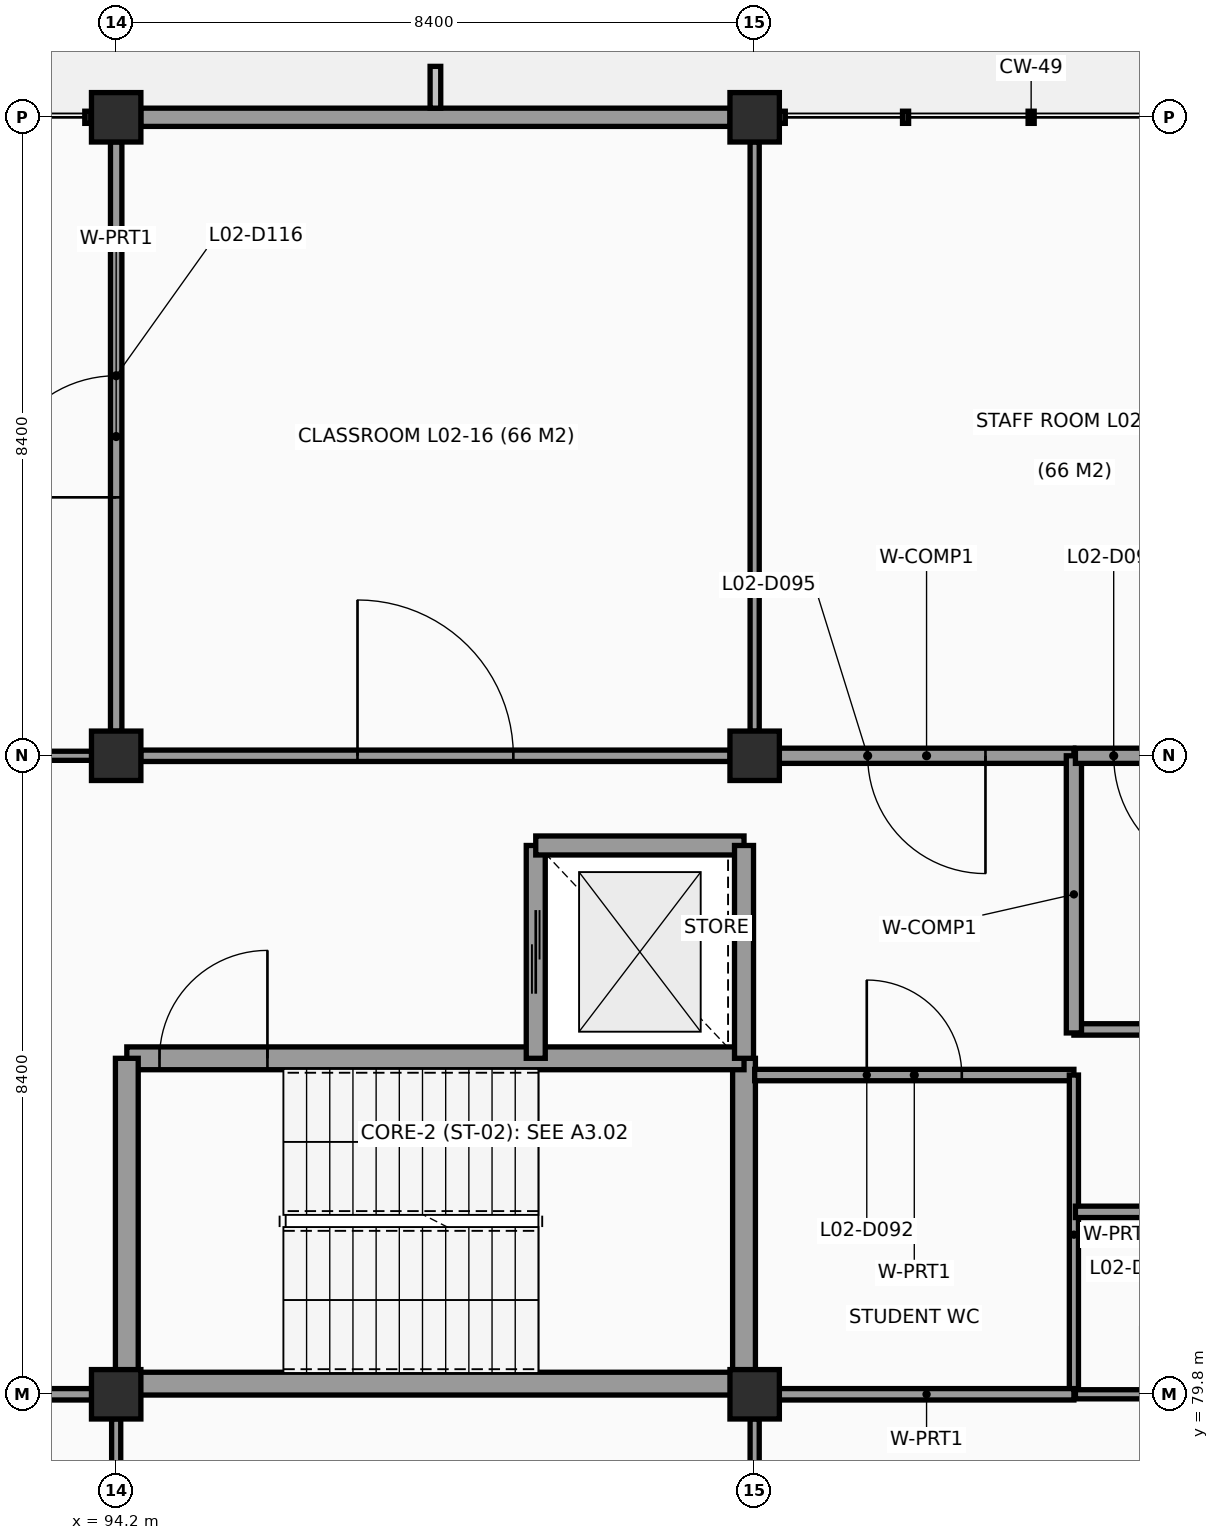
"""IFC4 building model, lengths in metres.
Left out: names, types, materials, properties, quantities, classifications, styles, units other than length and angle.
Written with IfcOpenShell. Run it as: python <this file> out.ifc"""

import sys

from ifc_helpers import new_model, si_unit, direction, frame, frame_2d, origin, origin_2d, place, context, subcontext, project, spatial, rectangle, extrude, element, fill, save


model = new_model("IFC4")
c1 = context("Model", 3, precision=1e-05, world=origin(), true_north=direction((0.0, 1.0)))
c2 = subcontext(c1, "Body", "Model", "MODEL_VIEW")
j1 = project(units=[si_unit("LENGTHUNIT", "METRE"), si_unit("PLANEANGLEUNIT", "RADIAN")], contexts=[c1])
p1 = place(None, origin())
s1 = spatial("IfcSite", under=j1, at=p1, CompositionType="ELEMENT")
p2 = place(p1, origin())
s2 = spatial("IfcBuilding", under=s1, at=p2, CompositionType="ELEMENT")
p3 = place(p2, frame((0.0, 0.0, 7.8)))
s3 = spatial("IfcBuildingStorey", under=s2, at=p3, CompositionType="ELEMENT", Elevation=7.8)
for number, where, z_axis, x_axis in (
    (1, (94.2, 79.8, 0.0), (0.0, 0.0, 1.0), (1.0, 0.0, 0.0)),
    (2, (94.2, 88.2, 0.0), (0.0, 0.0, 1.0), (1.0, 0.0, 0.0)),
    (3, (94.2, 96.6, 0.0), (0.0, 0.0, 1.0), (1.0, 0.0, 0.0)),
    (4, (102.6, 79.8, 0.0), (0.0, 0.0, 1.0), (1.0, 0.0, 0.0)),
    (5, (102.6, 88.2, 0.0), (0.0, 0.0, 1.0), (1.0, 0.0, 0.0)),
    (6, (102.6, 96.6, 0.0), (0.0, 0.0, 1.0), (1.0, 0.0, 0.0)),
):
    element("IfcColumn", number, at=place(p3, frame(where, z_axis=z_axis, x_axis=x_axis)), inside=s3, PredefinedType="COLUMN", context=c2, shape_type="SweptSolid", body=[
        extrude(rectangle(XDim=0.65, YDim=0.65, at=origin_2d()), origin(), (0.0, 0.0, 1.0), 3.6),
    ])
p4 = place(p3, frame((94.523, 96.6, 0.0), z_axis=(0.0, 0.0, 1.0), x_axis=(1.0, 0.0, 0.0)))
e7 = element("IfcWall", 7, at=p4, inside=s3, PredefinedType="SOLIDWALL", context=c2, shape_type="SweptSolid", body=[
    extrude(rectangle(XDim=7.754, YDim=0.24, at=frame_2d((3.877, 0.0))), origin(), (0.0, 0.0, 1.0), 2.64),
])
p5 = place(p3, frame((94.34, 79.94, 0.0), z_axis=(0.0, 0.0, 1.0), x_axis=(1.0, 0.0, 0.0)))
e8 = element("IfcWall", 8, at=p5, inside=s3, PredefinedType="SHEAR", context=c2, shape_type="SweptSolid", body=[
    extrude(rectangle(XDim=8.12, YDim=0.3, at=frame_2d((4.06, 0.0))), origin(), (0.0, 0.0, 1.0), 3.6),
])
p6 = place(p3, frame((102.46, 79.94, 0.0), z_axis=(0.0, 0.0, 1.0), x_axis=(0.0, 1.0, 0.0)))
e9 = element("IfcWall", 9, at=p6, inside=s3, PredefinedType="SHEAR", context=c2, shape_type="SweptSolid", body=[
    extrude(rectangle(XDim=4.28, YDim=0.3, at=frame_2d((2.14, 0.0))), origin(), (0.0, 0.0, 1.0), 3.6),
])
p7 = place(p3, frame((102.46, 84.22, 0.0), z_axis=(0.0, 0.0, 1.0), x_axis=(-1.0, 0.0, 0.0)))
e10 = element("IfcWall", 10, at=p7, inside=s3, PredefinedType="SHEAR", context=c2, shape_type="SweptSolid", body=[
    extrude(rectangle(XDim=8.12, YDim=0.3, at=frame_2d((4.06, 0.0))), origin(), (0.0, 0.0, 1.0), 3.6),
])
p8 = place(p7, frame((6.27, 0.0, 0.0)))
e11 = element("IfcOpeningElement", 11, at=p8, cuts=e10, PredefinedType="OPENING", context=c2, shape_type="SweptSolid", body=[
    extrude(rectangle(XDim=1.42, YDim=2.15, at=frame_2d((0.71, 1.075))), frame((0.0, 0.16, 0.0), z_axis=(0.0, -1.0, 0.0), x_axis=(1.0, 0.0, 0.0)), (0.0, 0.0, 1.0), 0.32),
])
p9 = place(p3, frame((94.34, 84.22, 0.0), z_axis=(0.0, 0.0, 1.0), x_axis=(0.0, -1.0, 0.0)))
e12 = element("IfcWall", 12, at=p9, inside=s3, PredefinedType="SHEAR", context=c2, shape_type="SweptSolid", body=[
    extrude(rectangle(XDim=4.28, YDim=0.3, at=frame_2d((2.14, 0.0))), origin(), (0.0, 0.0, 1.0), 3.6),
])
p10 = place(p3, frame((99.72, 87.02, 0.0), z_axis=(0.0, 0.0, 1.0), x_axis=(0.0, -1.0, 0.0)))
e13 = element("IfcWall", 13, at=p10, inside=s3, PredefinedType="SHEAR", context=c2, shape_type="SweptSolid", body=[
    extrude(rectangle(XDim=2.8, YDim=0.25, at=frame_2d((1.4, 0.0))), origin(), (0.0, 0.0, 1.0), 3.6),
])
p11 = place(p10, frame((0.85, 0.0, 0.0)))
e14 = element("IfcOpeningElement", 14, at=p11, cuts=e13, PredefinedType="OPENING", context=c2, shape_type="SweptSolid", body=[
    extrude(rectangle(XDim=1.1, YDim=2.15, at=frame_2d((0.55, 1.075))), frame((0.0, 0.135, 0.0), z_axis=(0.0, -1.0, 0.0), x_axis=(1.0, 0.0, 0.0)), (0.0, 0.0, 1.0), 0.27),
])
p12 = place(p3, frame((102.46, 87.02, 0.0), z_axis=(0.0, 0.0, 1.0), x_axis=(-1.0, 0.0, 0.0)))
e15 = element("IfcWall", 15, at=p12, inside=s3, PredefinedType="SHEAR", context=c2, shape_type="SweptSolid", body=[
    extrude(rectangle(XDim=2.74, YDim=0.25, at=frame_2d((1.37, 0.0))), origin(), (0.0, 0.0, 1.0), 3.6),
])
p13 = place(p3, frame((102.46, 84.22, 0.0), z_axis=(0.0, 0.0, 1.0), x_axis=(0.0, 1.0, 0.0)))
e16 = element("IfcWall", 16, at=p13, inside=s3, PredefinedType="SHEAR", context=c2, shape_type="SweptSolid", body=[
    extrude(rectangle(XDim=2.8, YDim=0.25, at=frame_2d((1.4, 0.0))), origin(), (0.0, 0.0, 1.0), 3.6),
])
p14 = place(p3, frame((102.6, 84.0, 0.0), z_axis=(0.0, 0.0, 1.0), x_axis=(1.0, 0.0, 0.0)))
e17 = element("IfcWall", 17, at=p14, inside=s3, PredefinedType="PARTITIONING", context=c2, shape_type="SweptSolid", body=[
    extrude(rectangle(XDim=4.2, YDim=0.15, at=frame_2d((2.1, 0.0))), origin(), (0.0, 0.0, 1.0), 2.74),
])
p15 = place(p14, frame((1.475, 0.0, 0.0)))
e18 = element("IfcOpeningElement", 18, at=p15, cuts=e17, PredefinedType="OPENING", context=c2, shape_type="SweptSolid", body=[
    extrude(rectangle(XDim=1.25, YDim=2.15, at=frame_2d((0.625, 1.075))), frame((0.0, 0.085, 0.0), z_axis=(0.0, -1.0, 0.0), x_axis=(1.0, 0.0, 0.0)), (0.0, 0.0, 1.0), 0.17),
])
p16 = place(p3, frame((106.8, 84.0, 0.0), z_axis=(0.0, 0.0, 1.0), x_axis=(0.0, -1.0, 0.0)))
e19 = element("IfcWall", 19, at=p16, inside=s3, PredefinedType="PARTITIONING", context=c2, shape_type="SweptSolid", body=[
    extrude(rectangle(XDim=4.2, YDim=0.12, at=frame_2d((2.1, 0.0))), origin(), (0.0, 0.0, 1.0), 2.95),
])
p17 = place(p3, frame((106.8, 79.8, 0.0), z_axis=(0.0, 0.0, 1.0), x_axis=(-1.0, 0.0, 0.0)))
e20 = element("IfcWall", 20, at=p17, inside=s3, PredefinedType="PARTITIONING", context=c2, shape_type="SweptSolid", body=[
    extrude(rectangle(XDim=3.877, YDim=0.15, at=frame_2d((1.938, 0.0))), origin(), (0.0, 0.0, 1.0), 2.95),
])
p18 = place(p3, frame((110.727, 79.8, 0.0), z_axis=(0.0, 0.0, 1.0), x_axis=(-1.0, 0.0, 0.0)))
e21 = element("IfcWall", 21, at=p18, inside=s3, PredefinedType="PARTITIONING", context=c2, shape_type="SweptSolid", body=[
    extrude(rectangle(XDim=3.907, YDim=0.12, at=frame_2d((1.954, 0.0))), origin(), (0.0, 0.0, 1.0), 2.95),
])
p19 = place(p18, frame((2.154, 0.0, 0.0)))
e22 = element("IfcOpeningElement", 22, at=p19, cuts=e21, PredefinedType="OPENING", context=c2, shape_type="SweptSolid", body=[
    extrude(rectangle(XDim=0.9, YDim=2.1, at=frame_2d((0.45, 1.05))), frame((0.0, 0.07, 0.0), z_axis=(0.0, -1.0, 0.0), x_axis=(1.0, 0.0, 0.0)), (0.0, 0.0, 1.0), 0.14),
])
p20 = place(p3, frame((106.82, 82.2, 0.0), z_axis=(0.0, 0.0, 1.0), x_axis=(1.0, 0.0, 0.0)))
e23 = element("IfcWall", 23, at=p20, inside=s3, PredefinedType="PARTITIONING", context=c2, shape_type="SweptSolid", body=[
    extrude(rectangle(XDim=4.18, YDim=0.15, at=frame_2d((2.09, 0.0))), origin(), (0.0, 0.0, 1.0), 2.94),
])
p21 = place(p3, frame((106.8, 84.6, 0.0), z_axis=(0.0, 0.0, 1.0), x_axis=(1.0, 0.0, 0.0)))
e24 = element("IfcWall", 24, at=p21, inside=s3, PredefinedType="PARTITIONING", context=c2, shape_type="SweptSolid", body=[
    extrude(rectangle(XDim=4.2, YDim=0.15, at=frame_2d((2.1, 0.0))), origin(), (0.0, 0.0, 1.0), 2.94),
])
p22 = place(p21, frame((1.5, 0.0, 0.0)))
e25 = element("IfcOpeningElement", 25, at=p22, cuts=e24, PredefinedType="OPENING", context=c2, shape_type="SweptSolid", body=[
    extrude(rectangle(XDim=1.2, YDim=2.15, at=frame_2d((0.6, 1.075))), frame((0.0, 0.085, 0.0), z_axis=(0.0, -1.0, 0.0), x_axis=(1.0, 0.0, 0.0)), (0.0, 0.0, 1.0), 0.17),
])
p23 = place(p3, frame((102.923, 88.2, 0.0), z_axis=(0.0, 0.0, 1.0), x_axis=(1.0, 0.0, 0.0)))
e26 = element("IfcWall", 26, at=p23, inside=s3, PredefinedType="PARTITIONING", context=c2, shape_type="SweptSolid", body=[
    extrude(rectangle(XDim=3.877, YDim=0.2, at=frame_2d((1.938, 0.0))), origin(), (0.0, 0.0, 1.0), 2.59),
])
p24 = place(p23, frame((1.164, 0.0, 0.0)))
e27 = element("IfcOpeningElement", 27, at=p24, cuts=e26, PredefinedType="OPENING", context=c2, shape_type="SweptSolid", body=[
    extrude(rectangle(XDim=1.55, YDim=2.2, at=frame_2d((0.775, 1.1))), frame((0.0, 0.11, 0.0), z_axis=(0.0, -1.0, 0.0), x_axis=(1.0, 0.0, 0.0)), (0.0, 0.0, 1.0), 0.22),
])
p25 = place(p3, frame((106.8, 88.2, 0.0), z_axis=(0.0, 0.0, 1.0), x_axis=(0.0, -1.0, 0.0)))
e28 = element("IfcWall", 28, at=p25, inside=s3, PredefinedType="PARTITIONING", context=c2, shape_type="SweptSolid", body=[
    extrude(rectangle(XDim=3.646, YDim=0.2, at=frame_2d((1.823, 0.0))), origin(), (0.0, 0.0, 1.0), 2.59),
])
p26 = place(p3, frame((106.82, 88.2, 0.0), z_axis=(0.0, 0.0, 1.0), x_axis=(1.0, 0.0, 0.0)))
e29 = element("IfcWall", 29, at=p26, inside=s3, PredefinedType="PARTITIONING", context=c2, shape_type="SweptSolid", body=[
    extrude(rectangle(XDim=3.907, YDim=0.2, at=frame_2d((1.954, 0.0))), origin(), (0.0, 0.0, 1.0), 2.59),
])
p27 = place(p26, frame((0.503, 0.0, 0.0)))
e30 = element("IfcOpeningElement", 30, at=p27, cuts=e29, PredefinedType="OPENING", context=c2, shape_type="SweptSolid", body=[
    extrude(rectangle(XDim=1.6, YDim=2.2, at=frame_2d((0.8, 1.1))), frame((0.0, 0.11, 0.0), z_axis=(0.0, -1.0, 0.0), x_axis=(1.0, 0.0, 0.0)), (0.0, 0.0, 1.0), 0.22),
])
p28 = place(p3, frame((86.123, 79.8, 0.0), z_axis=(0.0, 0.0, 1.0), x_axis=(1.0, 0.0, 0.0)))
e31 = element("IfcWall", 31, at=p28, inside=s3, PredefinedType="PARTITIONING", context=c2, shape_type="SweptSolid", body=[
    extrude(rectangle(XDim=7.754, YDim=0.15, at=frame_2d((3.877, 0.0))), origin(), (0.0, 0.0, 1.0), 2.95),
])
p29 = place(p3, frame((94.2, 79.477, 0.0), z_axis=(0.0, 0.0, 1.0), x_axis=(0.0, -1.0, 0.0)))
e32 = element("IfcWall", 32, at=p29, inside=s3, PredefinedType="PARTITIONING", context=c2, shape_type="SweptSolid", body=[
    extrude(rectangle(XDim=5.657, YDim=0.12, at=frame_2d((2.829, 0.0))), origin(), (0.0, 0.0, 1.0), 2.69),
])
p30 = place(p3, frame((86.123, 88.2, 0.0), z_axis=(0.0, 0.0, 1.0), x_axis=(1.0, 0.0, 0.0)))
e33 = element("IfcWall", 33, at=p30, inside=s3, PredefinedType="PARTITIONING", context=c2, shape_type="SweptSolid", body=[
    extrude(rectangle(XDim=7.754, YDim=0.12, at=frame_2d((3.877, 0.0))), origin(), (0.0, 0.0, 1.0), 2.59),
])
p31 = place(p30, frame((3.387, 0.0, 0.0)))
e34 = element("IfcOpeningElement", 34, at=p31, cuts=e33, PredefinedType="OPENING", context=c2, shape_type="SweptSolid", body=[
    extrude(rectangle(XDim=0.98, YDim=2.12, at=frame_2d((0.49, 1.06))), frame((0.0, 0.07, 0.0), z_axis=(0.0, -1.0, 0.0), x_axis=(1.0, 0.0, 0.0)), (0.0, 0.0, 1.0), 0.14),
])
p32 = place(p3, frame((94.2, 96.277, 0.0), z_axis=(0.0, 0.0, 1.0), x_axis=(0.0, -1.0, 0.0)))
e35 = element("IfcWall", 35, at=p32, inside=s3, PredefinedType="PARTITIONING", context=c2, shape_type="SweptSolid", body=[
    extrude(rectangle(XDim=7.754, YDim=0.15, at=frame_2d((3.877, 0.0))), origin(), (0.0, 0.0, 1.0), 2.69),
])
p33 = place(p32, frame((3.077, 0.0, 0.0)))
e36 = element("IfcOpeningElement", 36, at=p33, cuts=e35, PredefinedType="OPENING", context=c2, shape_type="SweptSolid", body=[
    extrude(rectangle(XDim=1.6, YDim=2.2, at=frame_2d((0.8, 1.1))), frame((0.0, 0.085, 0.0), z_axis=(0.0, -1.0, 0.0), x_axis=(1.0, 0.0, 0.0)), (0.0, 0.0, 1.0), 0.17),
])
p34 = place(p3, frame((102.6, 79.477, 0.0), z_axis=(0.0, 0.0, 1.0), x_axis=(0.0, -1.0, 0.0)))
e37 = element("IfcWall", 37, at=p34, inside=s3, PredefinedType="PARTITIONING", context=c2, shape_type="SweptSolid", body=[
    extrude(rectangle(XDim=5.657, YDim=0.12, at=frame_2d((2.829, 0.0))), origin(), (0.0, 0.0, 1.0), 2.74),
])
p35 = place(p3, frame((102.277, 88.2, 0.0), z_axis=(0.0, 0.0, 1.0), x_axis=(-1.0, 0.0, 0.0)))
e38 = element("IfcWall", 38, at=p35, inside=s3, PredefinedType="PARTITIONING", context=c2, shape_type="SweptSolid", body=[
    extrude(rectangle(XDim=7.754, YDim=0.15, at=frame_2d((3.877, 0.0))), origin(), (0.0, 0.0, 1.0), 2.59),
])
p36 = place(p35, frame((2.852, 0.0, 0.0)))
e39 = element("IfcOpeningElement", 39, at=p36, cuts=e38, PredefinedType="OPENING", context=c2, shape_type="SweptSolid", body=[
    extrude(rectangle(XDim=2.05, YDim=2.35, at=frame_2d((1.025, 1.175))), frame((0.0, 0.085, 0.0), z_axis=(0.0, -1.0, 0.0), x_axis=(1.0, 0.0, 0.0)), (0.0, 0.0, 1.0), 0.17),
])
p37 = place(p3, frame((102.6, 96.277, 0.0), z_axis=(0.0, 0.0, 1.0), x_axis=(0.0, -1.0, 0.0)))
e40 = element("IfcWall", 40, at=p37, inside=s3, PredefinedType="PARTITIONING", context=c2, shape_type="SweptSolid", body=[
    extrude(rectangle(XDim=7.754, YDim=0.12, at=frame_2d((3.877, 0.0))), origin(), (0.0, 0.0, 1.0), 2.74),
])
p38 = place(p8, frame((1.42, 0.0, 0.0), z_axis=(0.0, 0.0, 1.0), x_axis=(-1.0, 0.0, 0.0)))
e41 = element("IfcDoor", 41, at=p38, inside=s3, OperationType="SINGLE_SWING_LEFT", PredefinedType="DOOR", context=c2, shape_type="SweptSolid", body=[
    extrude(rectangle(XDim=1.42, YDim=2.15, at=frame_2d((0.71, 1.075))), frame((0.0, 0.025, 0.0), z_axis=(0.0, -1.0, 0.0), x_axis=(1.0, 0.0, 0.0)), (0.0, 0.0, 1.0), 0.05),
])
fill(e11, e41)
p39 = place(p11, origin())
e42 = element("IfcDoor", 42, at=p39, inside=s3, OperationType="DOUBLE_DOOR_SLIDING", PredefinedType="DOOR", context=c2, shape_type="SweptSolid", body=[
    extrude(rectangle(XDim=1.1, YDim=2.15, at=frame_2d((0.55, 1.075))), frame((0.0, 0.025, 0.0), z_axis=(0.0, -1.0, 0.0), x_axis=(1.0, 0.0, 0.0)), (0.0, 0.0, 1.0), 0.05),
])
fill(e14, e42)
p40 = place(p15, origin())
e43 = element("IfcDoor", 43, at=p40, inside=s3, OperationType="SINGLE_SWING_LEFT", PredefinedType="DOOR", context=c2, shape_type="SweptSolid", body=[
    extrude(rectangle(XDim=1.25, YDim=2.15, at=frame_2d((0.625, 1.075))), frame((0.0, 0.025, 0.0), z_axis=(0.0, -1.0, 0.0), x_axis=(1.0, 0.0, 0.0)), (0.0, 0.0, 1.0), 0.05),
])
fill(e18, e43)
p41 = place(p24, origin())
e44 = element("IfcDoor", 44, at=p41, inside=s3, OperationType="DOUBLE_DOOR_SINGLE_SWING", PredefinedType="DOOR", context=c2, shape_type="SweptSolid", body=[
    extrude(rectangle(XDim=1.55, YDim=2.2, at=frame_2d((0.775, 1.1))), frame((0.0, 0.025, 0.0), z_axis=(0.0, -1.0, 0.0), x_axis=(1.0, 0.0, 0.0)), (0.0, 0.0, 1.0), 0.05),
])
fill(e27, e44)
p42 = place(p27, origin())
e45 = element("IfcDoor", 45, at=p42, inside=s3, OperationType="DOUBLE_DOOR_SINGLE_SWING", PredefinedType="DOOR", context=c2, shape_type="SweptSolid", body=[
    extrude(rectangle(XDim=1.6, YDim=2.2, at=frame_2d((0.8, 1.1))), frame((0.0, 0.025, 0.0), z_axis=(0.0, -1.0, 0.0), x_axis=(1.0, 0.0, 0.0)), (0.0, 0.0, 1.0), 0.05),
])
fill(e30, e45)
p43 = place(p33, origin())
e46 = element("IfcDoor", 46, at=p43, inside=s3, OperationType="DOUBLE_DOOR_SINGLE_SWING", PredefinedType="DOOR", context=c2, shape_type="SweptSolid", body=[
    extrude(rectangle(XDim=1.6, YDim=2.2, at=frame_2d((0.8, 1.1))), frame((0.0, 0.025, 0.0), z_axis=(0.0, -1.0, 0.0), x_axis=(1.0, 0.0, 0.0)), (0.0, 0.0, 1.0), 0.05),
])
fill(e36, e46)
p44 = place(p36, origin())
e47 = element("IfcDoor", 47, at=p44, inside=s3, OperationType="DOUBLE_DOOR_SINGLE_SWING", PredefinedType="DOOR", context=c2, shape_type="SweptSolid", body=[
    extrude(rectangle(XDim=2.05, YDim=2.35, at=frame_2d((1.025, 1.175))), frame((0.0, 0.025, 0.0), z_axis=(0.0, -1.0, 0.0), x_axis=(1.0, 0.0, 0.0)), (0.0, 0.0, 1.0), 0.05),
])
fill(e39, e47)
save(model, sys.argv[1])
